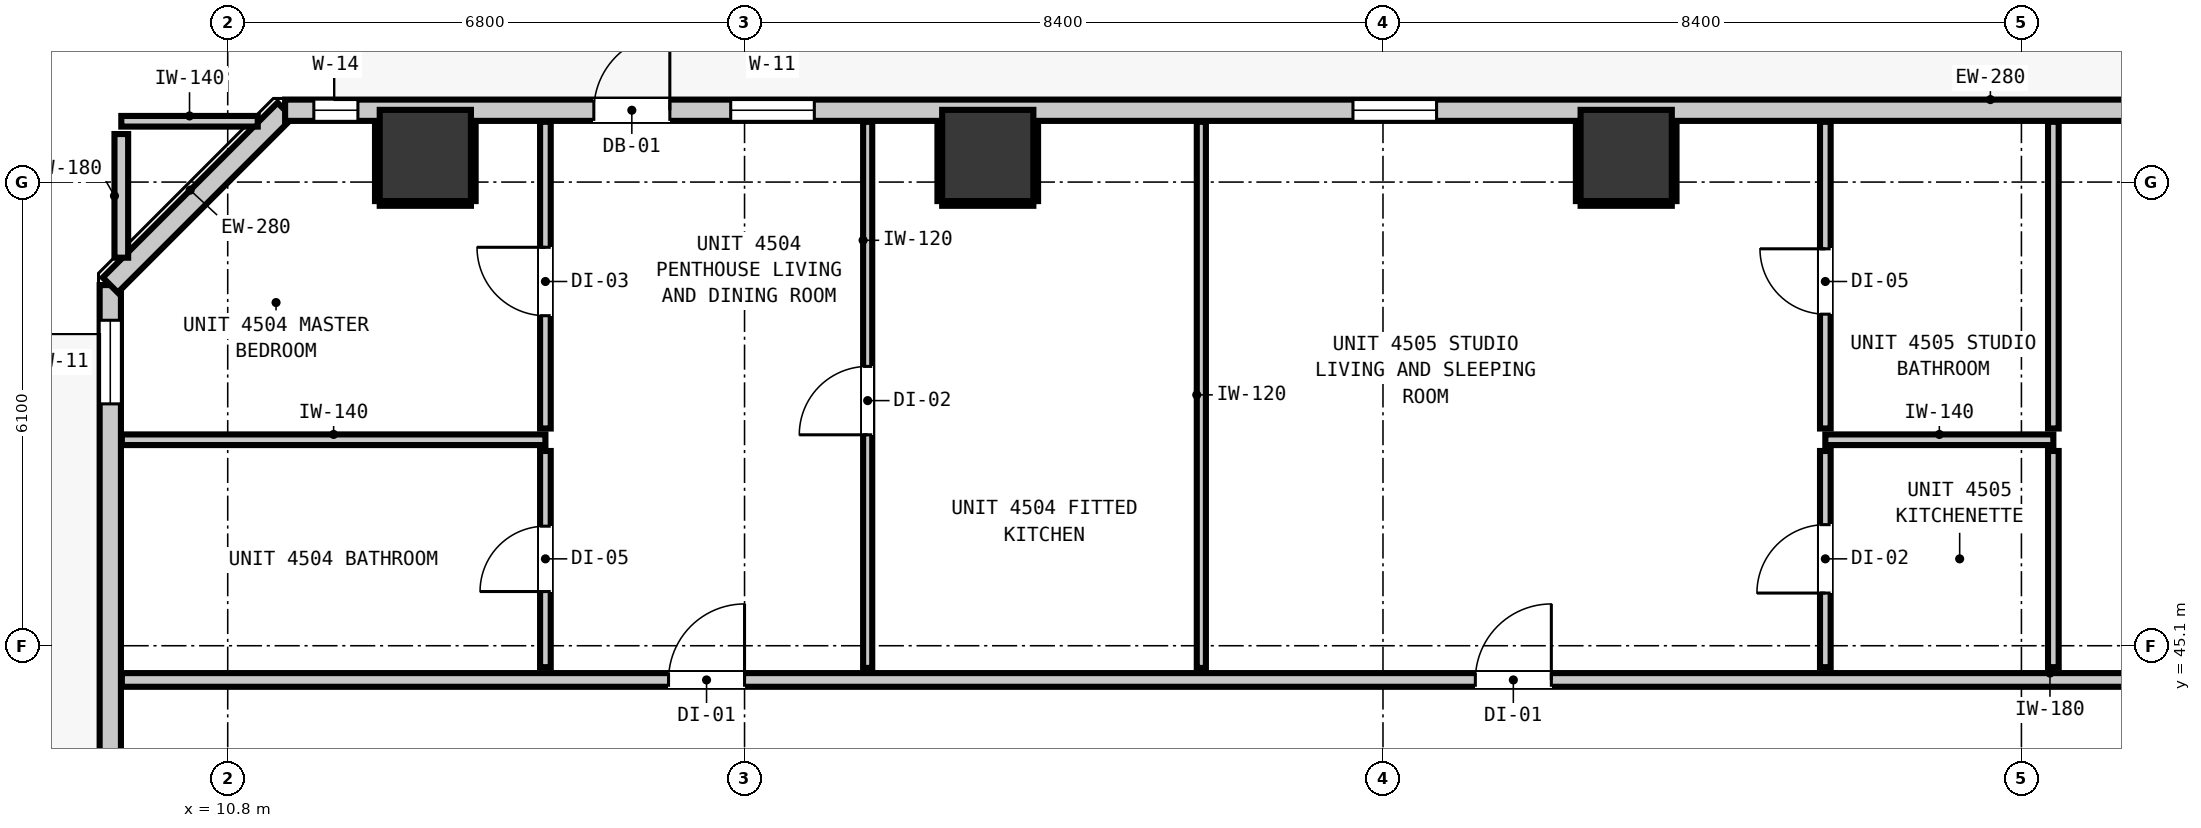
"""IFC4 building model, lengths in metres.
Left out: names, types, materials, properties, quantities, classifications, styles, units other than length and angle.
Written with IfcOpenShell. Run it as: python <this file> out.ifc"""

import sys

from ifc_helpers import new_model, si_unit, direction, frame, frame_2d, origin, origin_2d, place, context, subcontext, project, spatial, rectangle, extrude, element, fill, save


model = new_model("IFC4")
c1 = context("Model", 3, precision=1e-05, world=origin(), true_north=direction((0.0, 1.0)))
c2 = subcontext(c1, "Body", "Model", "MODEL_VIEW")
j1 = project(units=[si_unit("LENGTHUNIT", "METRE"), si_unit("PLANEANGLEUNIT", "RADIAN")], contexts=[c1])
p1 = place(None, origin())
s1 = spatial("IfcSite", under=j1, at=p1, CompositionType="ELEMENT")
p2 = place(p1, origin())
s2 = spatial("IfcBuilding", under=s1, at=p2, CompositionType="ELEMENT")
p3 = place(p2, frame((0.0, 0.0, 155.88)))
s3 = spatial("IfcBuildingStorey", under=s2, at=p3, CompositionType="ELEMENT", Elevation=155.88)
for number, where, z_axis, x_axis in (
    (1, (13.4, 51.55, 0.0), (0.0, 0.0, 1.0), (1.0, 0.0, 0.0)),
    (2, (20.8, 51.55, 0.0), (0.0, 0.0, 1.0), (1.0, 0.0, 0.0)),
    (3, (29.2, 51.55, 0.0), (0.0, 0.0, 1.0), (1.0, 0.0, 0.0)),
):
    element("IfcColumn", number, at=place(p3, frame(where, z_axis=z_axis, x_axis=x_axis)), inside=s3, PredefinedType="COLUMN", context=c2, shape_type="SweptSolid", body=[
        extrude(rectangle(XDim=1.2, YDim=1.2, at=origin_2d()), origin(), (0.0, 0.0, 1.0), 3.32),
    ])
p4 = place(p3, frame((9.255, 17.555, 0.0), z_axis=(0.0, 0.0, 1.0), x_axis=(0.0, 1.0, 0.0)))
e4 = element("IfcWall", 4, at=p4, inside=s3, PredefinedType="STANDARD", context=c2, shape_type="SweptSolid", body=[
    extrude(rectangle(XDim=32.29, YDim=0.28, at=frame_2d((16.145, 0.0))), origin(), (0.0, 0.0, 1.0), 3.08),
])
p5 = place(p4, frame((5.467, 0.0, 0.0)))
e5 = element("IfcOpeningElement", 5, at=p5, cuts=e4, PredefinedType="OPENING", context=c2, shape_type="SweptSolid", body=[
    extrude(rectangle(XDim=1.0, YDim=2.15, at=frame_2d((0.5, 1.075))), frame((0.0, 0.15, 0.0), z_axis=(0.0, -1.0, 0.0), x_axis=(1.0, 0.0, 0.0)), (0.0, 0.0, 1.0), 0.3),
])
p6 = place(p4, frame((30.727, 0.0, 0.85)))
e6 = element("IfcOpeningElement", 6, at=p6, cuts=e4, PredefinedType="OPENING", context=c2, shape_type="SweptSolid", body=[
    extrude(rectangle(XDim=1.1, YDim=2.05, at=frame_2d((0.55, 1.025))), frame((0.0, 0.15, 0.0), z_axis=(0.0, -1.0, 0.0), x_axis=(1.0, 0.0, 0.0)), (0.0, 0.0, 1.0), 0.3),
])
p7 = place(p3, frame((9.255, 49.845, 0.0), z_axis=(0.0, 0.0, 1.0), x_axis=(0.707106781187, 0.707106781187, 0.0)))
e7 = element("IfcWall", 7, at=p7, inside=s3, PredefinedType="STANDARD", context=c2, shape_type="SweptSolid", body=[
    extrude(rectangle(XDim=3.253, YDim=0.28, at=frame_2d((1.626, 0.0))), origin(), (0.0, 0.0, 1.0), 3.08),
])
p8 = place(p3, frame((11.555, 52.145, 0.0), z_axis=(0.0, 0.0, 1.0), x_axis=(1.0, 0.0, 0.0)))
e8 = element("IfcWall", 8, at=p8, inside=s3, PredefinedType="STANDARD", context=c2, shape_type="SweptSolid", body=[
    extrude(rectangle(XDim=35.09, YDim=0.28, at=frame_2d((17.545, 0.0))), origin(), (0.0, 0.0, 1.0), 3.08),
])
p9 = place(p8, frame((4.062, 0.0, 0.0)))
e9 = element("IfcOpeningElement", 9, at=p9, cuts=e8, PredefinedType="OPENING", context=c2, shape_type="SweptSolid", body=[
    extrude(rectangle(XDim=1.0, YDim=2.15, at=frame_2d((0.5, 1.075))), frame((0.0, 0.15, 0.0), z_axis=(0.0, -1.0, 0.0), x_axis=(1.0, 0.0, 0.0)), (0.0, 0.0, 1.0), 0.3),
])
p10 = place(p8, frame((5.863, 0.0, 0.85)))
e10 = element("IfcOpeningElement", 10, at=p10, cuts=e8, PredefinedType="OPENING", context=c2, shape_type="SweptSolid", body=[
    extrude(rectangle(XDim=1.1, YDim=2.05, at=frame_2d((0.55, 1.025))), frame((0.0, 0.15, 0.0), z_axis=(0.0, -1.0, 0.0), x_axis=(1.0, 0.0, 0.0)), (0.0, 0.0, 1.0), 0.3),
])
p11 = place(p8, frame((0.378, 0.0, 0.85)))
e11 = element("IfcOpeningElement", 11, at=p11, cuts=e8, PredefinedType="OPENING", context=c2, shape_type="SweptSolid", body=[
    extrude(rectangle(XDim=0.58, YDim=1.5, at=frame_2d((0.29, 0.75))), frame((0.0, 0.15, 0.0), z_axis=(0.0, -1.0, 0.0), x_axis=(1.0, 0.0, 0.0)), (0.0, 0.0, 1.0), 0.3),
])
p12 = place(p8, frame((14.05, 0.0, 0.85)))
e12 = element("IfcOpeningElement", 12, at=p12, cuts=e8, PredefinedType="OPENING", context=c2, shape_type="SweptSolid", body=[
    extrude(rectangle(XDim=1.1, YDim=2.05, at=frame_2d((0.55, 1.025))), frame((0.0, 0.15, 0.0), z_axis=(0.0, -1.0, 0.0), x_axis=(1.0, 0.0, 0.0)), (0.0, 0.0, 1.0), 0.3),
])
p13 = place(p8, frame((29.723, 0.0, 0.85)))
e13 = element("IfcOpeningElement", 13, at=p13, cuts=e8, PredefinedType="OPENING", context=c2, shape_type="SweptSolid", body=[
    extrude(rectangle(XDim=1.1, YDim=2.05, at=frame_2d((0.55, 1.025))), frame((0.0, 0.15, 0.0), z_axis=(0.0, -1.0, 0.0), x_axis=(1.0, 0.0, 0.0)), (0.0, 0.0, 1.0), 0.3),
])
p14 = place(p3, frame((9.407, 44.65, 0.0), z_axis=(0.0, 0.0, 1.0), x_axis=(1.0, 0.0, 0.0)))
e14 = element("IfcWall", 14, at=p14, inside=s3, PredefinedType="PARTITIONING", context=c2, shape_type="SweptSolid", body=[
    extrude(rectangle(XDim=39.386, YDim=0.18, at=frame_2d((19.693, 0.0))), origin(), (0.0, 0.0, 1.0), 3.08),
])
p15 = place(p14, frame((7.193, 0.0, 0.0)))
e15 = element("IfcOpeningElement", 15, at=p15, cuts=e14, PredefinedType="OPENING", context=c2, shape_type="SweptSolid", body=[
    extrude(rectangle(XDim=1.0, YDim=2.15, at=frame_2d((0.5, 1.075))), frame((0.0, 0.1, 0.0), z_axis=(0.0, -1.0, 0.0), x_axis=(1.0, 0.0, 0.0)), (0.0, 0.0, 1.0), 0.2),
])
p16 = place(p14, frame((17.808, 0.0, 0.0)))
e16 = element("IfcOpeningElement", 16, at=p16, cuts=e14, PredefinedType="OPENING", context=c2, shape_type="SweptSolid", body=[
    extrude(rectangle(XDim=1.0, YDim=2.15, at=frame_2d((0.5, 1.075))), frame((0.0, 0.1, 0.0), z_axis=(0.0, -1.0, 0.0), x_axis=(1.0, 0.0, 0.0)), (0.0, 0.0, 1.0), 0.2),
])
p17 = place(p14, frame((31.929, 0.0, 0.0)))
e17 = element("IfcOpeningElement", 17, at=p17, cuts=e14, PredefinedType="OPENING", context=c2, shape_type="SweptSolid", body=[
    extrude(rectangle(XDim=0.9, YDim=2.1, at=frame_2d((0.45, 1.05))), frame((0.0, 0.1, 0.0), z_axis=(0.0, -1.0, 0.0), x_axis=(1.0, 0.0, 0.0)), (0.0, 0.0, 1.0), 0.2),
])
p18 = place(p3, frame((9.407, 47.81, 0.0), z_axis=(0.0, 0.0, 1.0), x_axis=(1.0, 0.0, 0.0)))
e18 = element("IfcWall", 18, at=p18, inside=s3, PredefinedType="PARTITIONING", context=c2, shape_type="SweptSolid", body=[
    extrude(rectangle(XDim=5.573, YDim=0.14, at=frame_2d((2.787, 0.0))), origin(), (0.0, 0.0, 1.0), 3.08),
])
p19 = place(p3, frame((31.82, 47.81, 0.0), z_axis=(0.0, 0.0, 1.0), x_axis=(1.0, 0.0, 0.0)))
e19 = element("IfcWall", 19, at=p19, inside=s3, PredefinedType="PARTITIONING", context=c2, shape_type="SweptSolid", body=[
    extrude(rectangle(XDim=3.0, YDim=0.14, at=frame_2d((1.5, 0.0))), origin(), (0.0, 0.0, 1.0), 3.08),
])
p20 = place(p3, frame((9.4, 52.0, 0.0), z_axis=(0.0, 0.0, 1.0), x_axis=(1.0, 0.0, 0.0)))
e20 = element("IfcWall", 20, at=p20, inside=s3, PredefinedType="PARTITIONING", context=c2, shape_type="SweptSolid", body=[
    extrude(rectangle(XDim=1.795, YDim=0.14, at=frame_2d((0.897, 0.0))), origin(), (0.0, 0.0, 1.0), 3.08),
])
p21 = place(p3, frame((9.4, 50.205, 0.0), z_axis=(0.0, 0.0, 1.0), x_axis=(0.0, 1.0, 0.0)))
e21 = element("IfcWall", 21, at=p21, inside=s3, PredefinedType="PARTITIONING", context=c2, shape_type="SweptSolid", body=[
    extrude(rectangle(XDim=1.627, YDim=0.18, at=frame_2d((0.813, 0.0))), origin(), (0.0, 0.0, 1.0), 3.08),
])
p22 = place(p3, frame((14.98, 44.818, 0.0), z_axis=(0.0, 0.0, 1.0), x_axis=(0.0, 1.0, 0.0)))
e22 = element("IfcWall", 22, at=p22, inside=s3, PredefinedType="PARTITIONING", context=c2, shape_type="SweptSolid", body=[
    extrude(rectangle(XDim=2.844, YDim=0.14, at=frame_2d((1.422, 0.0))), origin(), (0.0, 0.0, 1.0), 3.08),
])
p23 = place(p22, frame((0.995, 0.0, 0.0)))
e23 = element("IfcOpeningElement", 23, at=p23, cuts=e22, PredefinedType="OPENING", context=c2, shape_type="SweptSolid", body=[
    extrude(rectangle(XDim=0.86, YDim=2.02, at=frame_2d((0.43, 1.01))), frame((0.0, 0.08, 0.0), z_axis=(0.0, -1.0, 0.0), x_axis=(1.0, 0.0, 0.0)), (0.0, 0.0, 1.0), 0.16),
])
p24 = place(p3, frame((14.98, 47.958, 0.0), z_axis=(0.0, 0.0, 1.0), x_axis=(0.0, 1.0, 0.0)))
e24 = element("IfcWall", 24, at=p24, inside=s3, PredefinedType="PARTITIONING", context=c2, shape_type="SweptSolid", body=[
    extrude(rectangle(XDim=4.035, YDim=0.14, at=frame_2d((2.018, 0.0))), origin(), (0.0, 0.0, 1.0), 3.08),
])
p25 = place(p24, frame((1.484, 0.0, 0.0)))
e25 = element("IfcOpeningElement", 25, at=p25, cuts=e24, PredefinedType="OPENING", context=c2, shape_type="SweptSolid", body=[
    extrude(rectangle(XDim=0.9, YDim=2.1, at=frame_2d((0.45, 1.05))), frame((0.0, 0.08, 0.0), z_axis=(0.0, -1.0, 0.0), x_axis=(1.0, 0.0, 0.0)), (0.0, 0.0, 1.0), 0.16),
])
p26 = place(p3, frame((31.82, 44.818, 0.0), z_axis=(0.0, 0.0, 1.0), x_axis=(0.0, 1.0, 0.0)))
e26 = element("IfcWall", 26, at=p26, inside=s3, PredefinedType="PARTITIONING", context=c2, shape_type="SweptSolid", body=[
    extrude(rectangle(XDim=2.844, YDim=0.14, at=frame_2d((1.422, 0.0))), origin(), (0.0, 0.0, 1.0), 3.08),
])
p27 = place(p26, frame((0.975, 0.0, 0.0)))
e27 = element("IfcOpeningElement", 27, at=p27, cuts=e26, PredefinedType="OPENING", context=c2, shape_type="SweptSolid", body=[
    extrude(rectangle(XDim=0.9, YDim=2.1, at=frame_2d((0.45, 1.05))), frame((0.0, 0.08, 0.0), z_axis=(0.0, -1.0, 0.0), x_axis=(1.0, 0.0, 0.0)), (0.0, 0.0, 1.0), 0.16),
])
p28 = place(p3, frame((31.82, 47.958, 0.0), z_axis=(0.0, 0.0, 1.0), x_axis=(0.0, 1.0, 0.0)))
e28 = element("IfcWall", 28, at=p28, inside=s3, PredefinedType="PARTITIONING", context=c2, shape_type="SweptSolid", body=[
    extrude(rectangle(XDim=4.035, YDim=0.14, at=frame_2d((2.018, 0.0))), origin(), (0.0, 0.0, 1.0), 3.08),
])
p29 = place(p28, frame((1.504, 0.0, 0.0)))
e29 = element("IfcOpeningElement", 29, at=p29, cuts=e28, PredefinedType="OPENING", context=c2, shape_type="SweptSolid", body=[
    extrude(rectangle(XDim=0.86, YDim=2.02, at=frame_2d((0.43, 1.01))), frame((0.0, 0.08, 0.0), z_axis=(0.0, -1.0, 0.0), x_axis=(1.0, 0.0, 0.0)), (0.0, 0.0, 1.0), 0.16),
])
p30 = place(p3, frame((34.82, 44.818, 0.0), z_axis=(0.0, 0.0, 1.0), x_axis=(0.0, 1.0, 0.0)))
e30 = element("IfcWall", 30, at=p30, inside=s3, PredefinedType="PARTITIONING", context=c2, shape_type="SweptSolid", body=[
    extrude(rectangle(XDim=2.844, YDim=0.14, at=frame_2d((1.422, 0.0))), origin(), (0.0, 0.0, 1.0), 3.08),
])
p31 = place(p3, frame((34.82, 47.958, 0.0), z_axis=(0.0, 0.0, 1.0), x_axis=(0.0, 1.0, 0.0)))
e31 = element("IfcWall", 31, at=p31, inside=s3, PredefinedType="PARTITIONING", context=c2, shape_type="SweptSolid", body=[
    extrude(rectangle(XDim=4.035, YDim=0.14, at=frame_2d((2.018, 0.0))), origin(), (0.0, 0.0, 1.0), 3.08),
])
p32 = place(p3, frame((19.22, 44.808, 0.0), z_axis=(0.0, 0.0, 1.0), x_axis=(0.0, 1.0, 0.0)))
e32 = element("IfcWall", 32, at=p32, inside=s3, PredefinedType="PARTITIONING", context=c2, shape_type="SweptSolid", body=[
    extrude(rectangle(XDim=7.185, YDim=0.12, at=frame_2d((3.592, 0.0))), origin(), (0.0, 0.0, 1.0), 3.08),
])
p33 = place(p32, frame((3.067, 0.0, 0.0)))
e33 = element("IfcOpeningElement", 33, at=p33, cuts=e32, PredefinedType="OPENING", context=c2, shape_type="SweptSolid", body=[
    extrude(rectangle(XDim=0.9, YDim=2.1, at=frame_2d((0.45, 1.05))), frame((0.0, 0.07, 0.0), z_axis=(0.0, -1.0, 0.0), x_axis=(1.0, 0.0, 0.0)), (0.0, 0.0, 1.0), 0.14),
])
p34 = place(p3, frame((23.61, 44.808, 0.0), z_axis=(0.0, 0.0, 1.0), x_axis=(0.0, 1.0, 0.0)))
e34 = element("IfcWall", 34, at=p34, inside=s3, PredefinedType="PARTITIONING", context=c2, shape_type="SweptSolid", body=[
    extrude(rectangle(XDim=7.185, YDim=0.12, at=frame_2d((3.592, 0.0))), origin(), (0.0, 0.0, 1.0), 3.08),
])
p35 = place(p3, frame((12.8, 50.918, 0.0), z_axis=(0.0, 0.0, 1.0), x_axis=(1.0, 0.0, 0.0)))
e35 = element("IfcWall", 35, at=p35, inside=s3, PredefinedType="PARTITIONING", context=c2, shape_type="SweptSolid", body=[
    extrude(rectangle(XDim=1.2, YDim=0.06, at=frame_2d((0.6, 0.0))), origin(), (0.0, 0.0, 1.0), 1.45),
])
for number, where, z_axis, x_axis in (
    (36, (12.768, 50.95, 0.0), (0.0, 0.0, 1.0), (0.0, 1.0, 0.0)),
    (37, (14.032, 50.95, 0.0), (0.0, 0.0, 1.0), (0.0, 1.0, 0.0)),
):
    element("IfcWall", number, at=place(p3, frame(where, z_axis=z_axis, x_axis=x_axis)), inside=s3, PredefinedType="PARTITIONING", context=c2, shape_type="SweptSolid", body=[
        extrude(rectangle(XDim=1.04, YDim=0.06, at=frame_2d((0.52, 0.0))), origin(), (0.0, 0.0, 1.0), 1.45),
    ])
p36 = place(p3, frame((20.2, 50.918, 0.0), z_axis=(0.0, 0.0, 1.0), x_axis=(1.0, 0.0, 0.0)))
e38 = element("IfcWall", 38, at=p36, inside=s3, PredefinedType="PARTITIONING", context=c2, shape_type="SweptSolid", body=[
    extrude(rectangle(XDim=1.2, YDim=0.06, at=frame_2d((0.6, 0.0))), origin(), (0.0, 0.0, 1.0), 1.45),
])
for number, where, z_axis, x_axis in (
    (39, (20.168, 50.95, 0.0), (0.0, 0.0, 1.0), (0.0, 1.0, 0.0)),
    (40, (21.432, 50.95, 0.0), (0.0, 0.0, 1.0), (0.0, 1.0, 0.0)),
):
    element("IfcWall", number, at=place(p3, frame(where, z_axis=z_axis, x_axis=x_axis)), inside=s3, PredefinedType="PARTITIONING", context=c2, shape_type="SweptSolid", body=[
        extrude(rectangle(XDim=1.04, YDim=0.06, at=frame_2d((0.52, 0.0))), origin(), (0.0, 0.0, 1.0), 1.45),
    ])
p37 = place(p3, frame((28.6, 50.918, 0.0), z_axis=(0.0, 0.0, 1.0), x_axis=(1.0, 0.0, 0.0)))
e41 = element("IfcWall", 41, at=p37, inside=s3, PredefinedType="PARTITIONING", context=c2, shape_type="SweptSolid", body=[
    extrude(rectangle(XDim=1.2, YDim=0.06, at=frame_2d((0.6, 0.0))), origin(), (0.0, 0.0, 1.0), 1.45),
])
for number, where, z_axis, x_axis in (
    (42, (28.568, 50.95, 0.0), (0.0, 0.0, 1.0), (0.0, 1.0, 0.0)),
    (43, (29.832, 50.95, 0.0), (0.0, 0.0, 1.0), (0.0, 1.0, 0.0)),
):
    element("IfcWall", number, at=place(p3, frame(where, z_axis=z_axis, x_axis=x_axis)), inside=s3, PredefinedType="PARTITIONING", context=c2, shape_type="SweptSolid", body=[
        extrude(rectangle(XDim=1.04, YDim=0.06, at=frame_2d((0.52, 0.0))), origin(), (0.0, 0.0, 1.0), 1.45),
    ])
p38 = place(p9, origin())
e44 = element("IfcDoor", 44, at=p38, inside=s3, OperationType="SINGLE_SWING_RIGHT", PredefinedType="DOOR", context=c2, shape_type="SweptSolid", body=[
    extrude(rectangle(XDim=1.0, YDim=2.15, at=frame_2d((0.5, 1.075))), frame((0.0, 0.025, 0.0), z_axis=(0.0, -1.0, 0.0), x_axis=(1.0, 0.0, 0.0)), (0.0, 0.0, 1.0), 0.05),
])
fill(e9, e44)
p39 = place(p6, origin())
e45 = element("IfcWindow", 45, at=p39, inside=s3, PartitioningType="SINGLE_PANEL", PredefinedType="WINDOW", context=c2, shape_type="SweptSolid", body=[
    extrude(rectangle(XDim=1.1, YDim=2.05, at=frame_2d((0.55, 1.025))), frame((0.0, 0.03, 0.0), z_axis=(0.0, -1.0, 0.0), x_axis=(1.0, 0.0, 0.0)), (0.0, 0.0, 1.0), 0.06),
])
fill(e6, e45)
p40 = place(p10, origin())
e46 = element("IfcWindow", 46, at=p40, inside=s3, PartitioningType="SINGLE_PANEL", PredefinedType="WINDOW", context=c2, shape_type="SweptSolid", body=[
    extrude(rectangle(XDim=1.1, YDim=2.05, at=frame_2d((0.55, 1.025))), frame((0.0, 0.03, 0.0), z_axis=(0.0, -1.0, 0.0), x_axis=(1.0, 0.0, 0.0)), (0.0, 0.0, 1.0), 0.06),
])
fill(e10, e46)
p41 = place(p11, origin())
e47 = element("IfcWindow", 47, at=p41, inside=s3, PartitioningType="SINGLE_PANEL", PredefinedType="WINDOW", context=c2, shape_type="SweptSolid", body=[
    extrude(rectangle(XDim=0.58, YDim=1.5, at=frame_2d((0.29, 0.75))), frame((0.0, 0.03, 0.0), z_axis=(0.0, -1.0, 0.0), x_axis=(1.0, 0.0, 0.0)), (0.0, 0.0, 1.0), 0.06),
])
fill(e11, e47)
p42 = place(p12, origin())
e48 = element("IfcWindow", 48, at=p42, inside=s3, PartitioningType="SINGLE_PANEL", PredefinedType="WINDOW", context=c2, shape_type="SweptSolid", body=[
    extrude(rectangle(XDim=1.1, YDim=2.05, at=frame_2d((0.55, 1.025))), frame((0.0, 0.03, 0.0), z_axis=(0.0, -1.0, 0.0), x_axis=(1.0, 0.0, 0.0)), (0.0, 0.0, 1.0), 0.06),
])
fill(e12, e48)
p43 = place(p15, origin())
e49 = element("IfcDoor", 49, at=p43, inside=s3, OperationType="SINGLE_SWING_RIGHT", PredefinedType="DOOR", context=c2, shape_type="SweptSolid", body=[
    extrude(rectangle(XDim=1.0, YDim=2.15, at=frame_2d((0.5, 1.075))), frame((0.0, 0.025, 0.0), z_axis=(0.0, -1.0, 0.0), x_axis=(1.0, 0.0, 0.0)), (0.0, 0.0, 1.0), 0.05),
])
fill(e15, e49)
p44 = place(p23, origin())
e50 = element("IfcDoor", 50, at=p44, inside=s3, OperationType="SINGLE_SWING_LEFT", PredefinedType="DOOR", context=c2, shape_type="SweptSolid", body=[
    extrude(rectangle(XDim=0.86, YDim=2.02, at=frame_2d((0.43, 1.01))), frame((0.0, 0.025, 0.0), z_axis=(0.0, -1.0, 0.0), x_axis=(1.0, 0.0, 0.0)), (0.0, 0.0, 1.0), 0.05),
])
fill(e23, e50)
p45 = place(p25, origin())
e51 = element("IfcDoor", 51, at=p45, inside=s3, OperationType="SINGLE_SWING_RIGHT", PredefinedType="DOOR", context=c2, shape_type="SweptSolid", body=[
    extrude(rectangle(XDim=0.9, YDim=2.1, at=frame_2d((0.45, 1.05))), frame((0.0, 0.025, 0.0), z_axis=(0.0, -1.0, 0.0), x_axis=(1.0, 0.0, 0.0)), (0.0, 0.0, 1.0), 0.05),
])
fill(e25, e51)
p46 = place(p33, origin())
e52 = element("IfcDoor", 52, at=p46, inside=s3, OperationType="SINGLE_SWING_LEFT", PredefinedType="DOOR", context=c2, shape_type="SweptSolid", body=[
    extrude(rectangle(XDim=0.9, YDim=2.1, at=frame_2d((0.45, 1.05))), frame((0.0, 0.025, 0.0), z_axis=(0.0, -1.0, 0.0), x_axis=(1.0, 0.0, 0.0)), (0.0, 0.0, 1.0), 0.05),
])
fill(e33, e52)
p47 = place(p16, origin())
e53 = element("IfcDoor", 53, at=p47, inside=s3, OperationType="SINGLE_SWING_RIGHT", PredefinedType="DOOR", context=c2, shape_type="SweptSolid", body=[
    extrude(rectangle(XDim=1.0, YDim=2.15, at=frame_2d((0.5, 1.075))), frame((0.0, 0.025, 0.0), z_axis=(0.0, -1.0, 0.0), x_axis=(1.0, 0.0, 0.0)), (0.0, 0.0, 1.0), 0.05),
])
fill(e16, e53)
p48 = place(p27, origin())
e54 = element("IfcDoor", 54, at=p48, inside=s3, OperationType="SINGLE_SWING_LEFT", PredefinedType="DOOR", context=c2, shape_type="SweptSolid", body=[
    extrude(rectangle(XDim=0.9, YDim=2.1, at=frame_2d((0.45, 1.05))), frame((0.0, 0.025, 0.0), z_axis=(0.0, -1.0, 0.0), x_axis=(1.0, 0.0, 0.0)), (0.0, 0.0, 1.0), 0.05),
])
fill(e27, e54)
p49 = place(p29, origin())
e55 = element("IfcDoor", 55, at=p49, inside=s3, OperationType="SINGLE_SWING_RIGHT", PredefinedType="DOOR", context=c2, shape_type="SweptSolid", body=[
    extrude(rectangle(XDim=0.86, YDim=2.02, at=frame_2d((0.43, 1.01))), frame((0.0, 0.025, 0.0), z_axis=(0.0, -1.0, 0.0), x_axis=(1.0, 0.0, 0.0)), (0.0, 0.0, 1.0), 0.05),
])
fill(e29, e55)
save(model, sys.argv[1])
